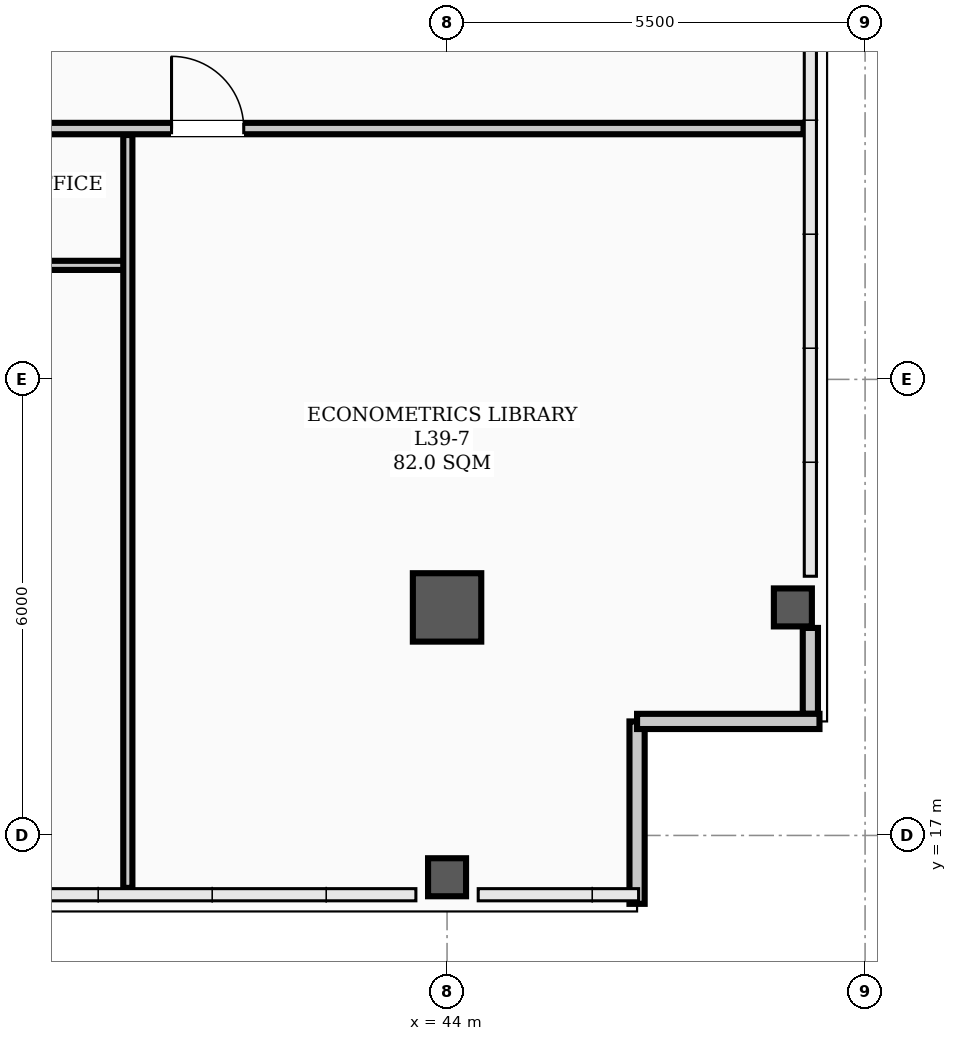
"""IFC4 building model, lengths in metres.
Left out: names, types, materials, properties, quantities, classifications, styles, units other than length and angle.
Written with IfcOpenShell. Run it as: python <this file> out.ifc"""

import sys

from ifc_helpers import new_model, si_unit, direction, frame, frame_2d, origin, origin_2d, place, context, subcontext, project, spatial, rectangle, hollow_rectangle, extrude, element, fill, save


model = new_model("IFC4")
c1 = context("Model", 3, precision=1e-05, world=origin(), true_north=direction((0.0, 1.0)))
c2 = subcontext(c1, "Body", "Model", "MODEL_VIEW")
j1 = project(units=[si_unit("LENGTHUNIT", "METRE"), si_unit("PLANEANGLEUNIT", "RADIAN")], contexts=[c1])
p1 = place(None, origin())
s1 = spatial("IfcSite", under=j1, at=p1, CompositionType="ELEMENT")
p2 = place(p1, origin())
s2 = spatial("IfcBuilding", under=s1, at=p2, CompositionType="ELEMENT")
p3 = place(p2, frame((0.0, 0.0, 157.8)))
s3 = spatial("IfcBuildingStorey", under=s2, at=p3, CompositionType="ELEMENT", Elevation=157.8)
p4 = place(p3, frame((44.0, 20.0, 0.0), z_axis=(0.0, 0.0, 1.0), x_axis=(1.0, 0.0, 0.0)))
e1 = element("IfcColumn", 1, at=p4, inside=s3, PredefinedType="COLUMN", context=c2, shape_type="SweptSolid", body=[
    extrude(hollow_rectangle(XDim=0.9, YDim=0.9, WallThickness=0.035, InnerFilletRadius=0.017, OuterFilletRadius=0.052, at=origin_2d()), origin(), (0.0, 0.0, 1.0), 3.9),
])
for number, where, z_axis, x_axis in (
    (2, (44.0, 16.45, 0.0), (0.0, 0.0, 1.0), (1.0, 0.0, 0.0)),
    (3, (48.55, 20.0, 0.0), (0.0, 0.0, 1.0), (1.0, 0.0, 0.0)),
):
    element("IfcColumn", number, at=place(p3, frame(where, z_axis=z_axis, x_axis=x_axis)), inside=s3, PredefinedType="COLUMN", context=c2, shape_type="SweptSolid", body=[
        extrude(hollow_rectangle(XDim=0.5, YDim=0.5, WallThickness=0.024, InnerFilletRadius=0.012, OuterFilletRadius=0.036, at=origin_2d()), origin(), (0.0, 0.0, 1.0), 3.9),
    ])
p5 = place(p3, frame((48.78, 18.6, 0.0), z_axis=(0.0, 0.0, 1.0), x_axis=(0.0, 1.0, 0.0)))
e4 = element("IfcWall", 4, at=p5, inside=s3, PredefinedType="PARAPET", context=c2, shape_type="SweptSolid", body=[
    extrude(rectangle(XDim=1.13, YDim=0.2, at=frame_2d((0.565, 0.0))), origin(), (0.0, 0.0, 1.0), 1.2),
])
for number, where, z_axis, x_axis in (
    (5, (46.5, 16.1, 0.0), (0.0, 0.0, 1.0), (0.0, 1.0, 0.0)),
    (6, (46.5, 18.5, 0.0), (0.0, 0.0, 1.0), (1.0, 0.0, 0.0)),
):
    element("IfcWall", number, at=place(p3, frame(where, z_axis=z_axis, x_axis=x_axis)), inside=s3, PredefinedType="PARAPET", context=c2, shape_type="SweptSolid", body=[
        extrude(rectangle(XDim=2.4, YDim=0.2, at=frame_2d((1.2, 0.0))), origin(), (0.0, 0.0, 1.0), 1.2),
    ])
p6 = place(p3, frame((2.31, 26.3, 0.0), z_axis=(0.0, 0.0, 1.0), x_axis=(1.0, 0.0, 0.0)))
e7 = element("IfcWall", 7, at=p6, inside=s3, PredefinedType="PARTITIONING", context=c2, shape_type="SweptSolid", body=[
    extrude(rectangle(XDim=46.38, YDim=0.15, at=frame_2d((23.19, 0.0))), origin(), (0.0, 0.0, 1.0), 3.2),
])
p7 = place(p6, frame((9.19, 0.0, 0.0)))
e8 = element("IfcOpeningElement", 8, at=p7, cuts=e7, PredefinedType="OPENING", context=c2, shape_type="SweptSolid", body=[
    extrude(rectangle(XDim=0.95, YDim=2.08, at=frame_2d((0.475, 1.04))), frame((0.0, 0.085, 0.0), z_axis=(0.0, -1.0, 0.0), x_axis=(1.0, 0.0, 0.0)), (0.0, 0.0, 1.0), 0.17),
])
p8 = place(p6, frame((14.815, 0.0, 0.0)))
e9 = element("IfcOpeningElement", 9, at=p8, cuts=e7, PredefinedType="OPENING", context=c2, shape_type="SweptSolid", body=[
    extrude(rectangle(XDim=0.95, YDim=2.08, at=frame_2d((0.475, 1.04))), frame((0.0, 0.085, 0.0), z_axis=(0.0, -1.0, 0.0), x_axis=(1.0, 0.0, 0.0)), (0.0, 0.0, 1.0), 0.17),
])
p9 = place(p6, frame((19.015, 0.0, 0.0)))
e10 = element("IfcOpeningElement", 10, at=p9, cuts=e7, PredefinedType="OPENING", context=c2, shape_type="SweptSolid", body=[
    extrude(rectangle(XDim=0.95, YDim=2.08, at=frame_2d((0.475, 1.04))), frame((0.0, 0.085, 0.0), z_axis=(0.0, -1.0, 0.0), x_axis=(1.0, 0.0, 0.0)), (0.0, 0.0, 1.0), 0.17),
])
p10 = place(p6, frame((26.315, 0.0, 0.0)))
e11 = element("IfcOpeningElement", 11, at=p10, cuts=e7, PredefinedType="OPENING", context=c2, shape_type="SweptSolid", body=[
    extrude(rectangle(XDim=0.95, YDim=2.08, at=frame_2d((0.475, 1.04))), frame((0.0, 0.085, 0.0), z_axis=(0.0, -1.0, 0.0), x_axis=(1.0, 0.0, 0.0)), (0.0, 0.0, 1.0), 0.17),
])
p11 = place(p6, frame((32.915, 0.0, 0.0)))
e12 = element("IfcOpeningElement", 12, at=p11, cuts=e7, PredefinedType="OPENING", context=c2, shape_type="SweptSolid", body=[
    extrude(rectangle(XDim=0.95, YDim=2.08, at=frame_2d((0.475, 1.04))), frame((0.0, 0.085, 0.0), z_axis=(0.0, -1.0, 0.0), x_axis=(1.0, 0.0, 0.0)), (0.0, 0.0, 1.0), 0.17),
])
p12 = place(p6, frame((38.065, 0.0, 0.0)))
e13 = element("IfcOpeningElement", 13, at=p12, cuts=e7, PredefinedType="OPENING", context=c2, shape_type="SweptSolid", body=[
    extrude(rectangle(XDim=0.95, YDim=2.08, at=frame_2d((0.475, 1.04))), frame((0.0, 0.085, 0.0), z_axis=(0.0, -1.0, 0.0), x_axis=(1.0, 0.0, 0.0)), (0.0, 0.0, 1.0), 0.17),
])
p13 = place(p3, frame((33.4, 24.5, 0.0), z_axis=(0.0, 0.0, 1.0), x_axis=(1.0, 0.0, 0.0)))
e14 = element("IfcWall", 14, at=p13, inside=s3, PredefinedType="PARTITIONING", context=c2, shape_type="SweptSolid", body=[
    extrude(rectangle(XDim=6.4, YDim=0.12, at=frame_2d((3.2, 0.0))), origin(), (0.0, 0.0, 1.0), 3.2),
])
p14 = place(p13, frame((1.825, 0.0, 0.0)))
e15 = element("IfcOpeningElement", 15, at=p14, cuts=e14, PredefinedType="OPENING", context=c2, shape_type="SweptSolid", body=[
    extrude(rectangle(XDim=0.95, YDim=2.08, at=frame_2d((0.475, 1.04))), frame((0.0, 0.07, 0.0), z_axis=(0.0, -1.0, 0.0), x_axis=(1.0, 0.0, 0.0)), (0.0, 0.0, 1.0), 0.14),
])
p15 = place(p3, frame((39.8, 16.31, 0.0), z_axis=(0.0, 0.0, 1.0), x_axis=(0.0, 1.0, 0.0)))
e16 = element("IfcWall", 16, at=p15, inside=s3, PredefinedType="PARTITIONING", context=c2, shape_type="SweptSolid", body=[
    extrude(rectangle(XDim=9.905, YDim=0.12, at=frame_2d((4.953, 0.0))), origin(), (0.0, 0.0, 1.0), 3.1),
])
p16 = place(p12, origin())
e17 = element("IfcDoor", 17, at=p16, inside=s3, OperationType="SINGLE_SWING_LEFT", PredefinedType="DOOR", context=c2, shape_type="SweptSolid", body=[
    extrude(rectangle(XDim=0.95, YDim=2.08, at=frame_2d((0.475, 1.04))), frame((0.0, 0.025, 0.0), z_axis=(0.0, -1.0, 0.0), x_axis=(1.0, 0.0, 0.0)), (0.0, 0.0, 1.0), 0.05),
])
fill(e13, e17)
save(model, sys.argv[1])
